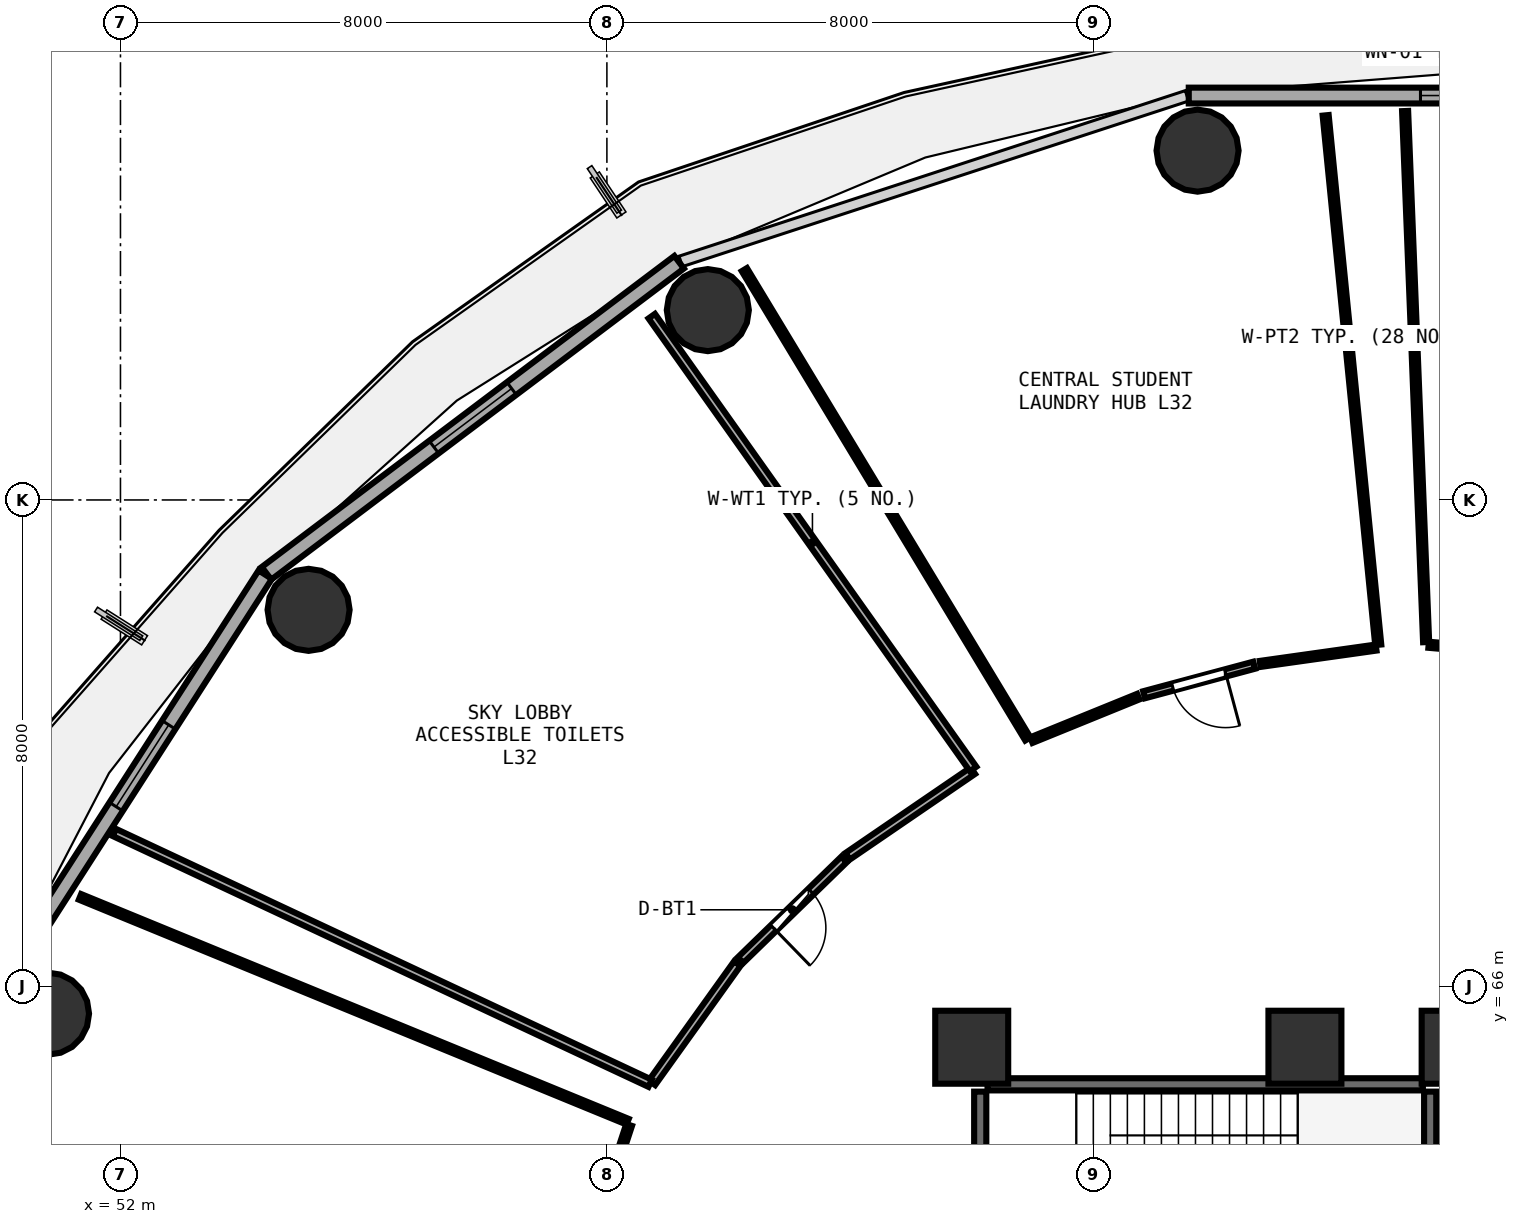
"""IFC4 building model, lengths in metres.
Left out: names, types, materials, properties, quantities, classifications, styles, units other than length and angle.
Written with IfcOpenShell. Run it as: python <this file> out.ifc"""

import sys

from ifc_helpers import new_model, si_unit, direction, frame, frame_2d, origin, origin_2d, place, context, subcontext, project, spatial, rectangle, circle, extrude, element, fill, save


model = new_model("IFC4")
c1 = context("Model", 3, precision=1e-05, world=origin(), true_north=direction((0.0, 1.0)))
c2 = subcontext(c1, "Body", "Model", "MODEL_VIEW")
j1 = project(units=[si_unit("LENGTHUNIT", "METRE"), si_unit("PLANEANGLEUNIT", "RADIAN")], contexts=[c1])
p1 = place(None, origin())
s1 = spatial("IfcSite", under=j1, at=p1, CompositionType="ELEMENT")
p2 = place(p1, origin())
s2 = spatial("IfcBuilding", under=s1, at=p2, CompositionType="ELEMENT")
p3 = place(p2, frame((0.0, 0.0, 125.1)))
s3 = spatial("IfcBuildingStorey", under=s2, at=p3, CompositionType="ELEMENT", Elevation=125.1)
for number, where, z_axis, x_axis in (
    (1, (74.0, 65.0, 0.0), (0.0, 0.0, 1.0), (1.0, 0.0, 0.0)),
    (2, (71.48, 65.0, 0.0), (0.0, 0.0, 1.0), (1.0, 0.0, 0.0)),
    (3, (66.0, 65.0, 0.0), (0.0, 0.0, 1.0), (1.0, 0.0, 0.0)),
):
    element("IfcColumn", number, at=place(p3, frame(where, z_axis=z_axis, x_axis=x_axis)), inside=s3, PredefinedType="PILASTER", context=c2, shape_type="SweptSolid", body=[
        extrude(rectangle(XDim=1.2, YDim=1.2, at=origin_2d()), origin(), (0.0, 0.0, 1.0), 4.76),
    ])
for number, where, z_axis, x_axis in (
    (4, (69.714, 79.745, 0.0), (0.0, 0.0, 1.0), (1.0, 0.0, 0.0)),
    (5, (61.66, 77.122, 0.0), (0.0, 0.0, 1.0), (1.0, 0.0, 0.0)),
    (6, (55.094, 72.193, 0.0), (0.0, 0.0, 1.0), (1.0, 0.0, 0.0)),
    (7, (50.808, 65.552, 0.0), (0.0, 0.0, 1.0), (1.0, 0.0, 0.0)),
):
    element("IfcColumn", number, at=place(p3, frame(where, z_axis=z_axis, x_axis=x_axis)), inside=s3, PredefinedType="COLUMN", context=c2, shape_type="SweptSolid", body=[
        extrude(circle(Radius=0.675, at=origin_2d()), origin(), (0.0, 0.0, 1.0), 4.76),
    ])
p4 = place(p3, frame((78.43, 80.651, 0.0), z_axis=(0.0, 0.0, 1.0), x_axis=(-1.0, 0.0, 0.0)))
e8 = element("IfcWall", 8, at=p4, inside=s3, PredefinedType="SOLIDWALL", context=c2, shape_type="SweptSolid", body=[
    extrude(rectangle(XDim=8.861, YDim=0.26, at=frame_2d((4.43, 0.0))), origin(), (0.0, 0.0, 1.0), 4.345),
])
p5 = place(p4, frame((3.45, 0.0, 0.85)))
e9 = element("IfcOpeningElement", 9, at=p5, cuts=e8, PredefinedType="OPENING", context=c2, shape_type="SweptSolid", body=[
    extrude(rectangle(XDim=1.6, YDim=1.45, at=frame_2d((0.8, 0.725))), frame((0.0, 0.14, 0.0), z_axis=(0.0, -1.0, 0.0), x_axis=(1.0, 0.0, 0.0)), (0.0, 0.0, 1.0), 0.28),
])
p6 = place(p3, frame((61.188, 77.91, 0.0), z_axis=(0.0, 0.0, 1.0), x_axis=(-0.798501507879, -0.601992808857, 0.0)))
e10 = element("IfcWall", 10, at=p6, inside=s3, PredefinedType="SOLIDWALL", context=c2, shape_type="SweptSolid", body=[
    extrude(rectangle(XDim=8.499, YDim=0.26, at=frame_2d((4.25, 0.0))), origin(), (0.0, 0.0, 1.0), 4.345),
])
p7 = place(p6, frame((3.45, 0.0, 0.85)))
e11 = element("IfcOpeningElement", 11, at=p7, cuts=e10, PredefinedType="OPENING", context=c2, shape_type="SweptSolid", body=[
    extrude(rectangle(XDim=1.6, YDim=1.45, at=frame_2d((0.8, 0.725))), frame((0.0, 0.14, 0.0), z_axis=(0.0, -1.0, 0.0), x_axis=(1.0, 0.0, 0.0)), (0.0, 0.0, 1.0), 0.28),
])
p8 = place(p3, frame((54.381, 72.771, 0.0), z_axis=(0.0, 0.0, 1.0), x_axis=(-0.540620528459, -0.841266571432, 0.0)))
e12 = element("IfcWall", 12, at=p8, inside=s3, PredefinedType="SOLIDWALL", context=c2, shape_type="SweptSolid", body=[
    extrude(rectangle(XDim=8.193, YDim=0.26, at=frame_2d((4.096, 0.0))), origin(), (0.0, 0.0, 1.0), 4.345),
])
p9 = place(p8, frame((2.936, 0.0, 0.85)))
e13 = element("IfcOpeningElement", 13, at=p9, cuts=e12, PredefinedType="OPENING", context=c2, shape_type="SweptSolid", body=[
    extrude(rectangle(XDim=1.6, YDim=1.45, at=frame_2d((0.8, 0.725))), frame((0.0, 0.14, 0.0), z_axis=(0.0, -1.0, 0.0), x_axis=(1.0, 0.0, 0.0)), (0.0, 0.0, 1.0), 0.28),
])
p10 = place(p3, frame((73.54, 61.2, 0.0), z_axis=(0.0, 0.0, 1.0), x_axis=(0.0, 1.0, 0.0)))
e14 = element("IfcWall", 14, at=p10, inside=s3, PredefinedType="SHEAR", context=c2, shape_type="SweptSolid", body=[
    extrude(rectangle(XDim=3.07, YDim=0.2, at=frame_2d((1.535, 0.0))), origin(), (0.0, 0.0, 1.0), 4.36),
])
p11 = place(p3, frame((73.42, 64.39, 0.0), z_axis=(0.0, 0.0, 1.0), x_axis=(-1.0, 0.0, 0.0)))
e15 = element("IfcWall", 15, at=p11, inside=s3, PredefinedType="SHEAR", context=c2, shape_type="SweptSolid", body=[
    extrude(rectangle(XDim=7.16, YDim=0.2, at=frame_2d((3.58, 0.0))), origin(), (0.0, 0.0, 1.0), 4.36),
])
p12 = place(p3, frame((66.14, 64.27, 0.0), z_axis=(0.0, 0.0, 1.0), x_axis=(0.0, -1.0, 0.0)))
e16 = element("IfcWall", 16, at=p12, inside=s3, PredefinedType="SHEAR", context=c2, shape_type="SweptSolid", body=[
    extrude(rectangle(XDim=3.07, YDim=0.2, at=frame_2d((1.535, 0.0))), origin(), (0.0, 0.0, 1.0), 4.36),
])
p13 = place(p12, frame((1.01, 0.0, 0.0)))
e17 = element("IfcOpeningElement", 17, at=p13, cuts=e16, PredefinedType="OPENING", context=c2, shape_type="SweptSolid", body=[
    extrude(rectangle(XDim=1.05, YDim=2.1, at=frame_2d((0.525, 1.05))), frame((0.0, 0.11, 0.0), z_axis=(0.0, -1.0, 0.0), x_axis=(1.0, 0.0, 0.0)), (0.0, 0.0, 1.0), 0.22),
])
p14 = place(p3, frame((70.646, 71.282, 0.0), z_axis=(0.0, 0.0, 1.0), x_axis=(-0.965816604619, -0.259226322432, 0.0)))
e18 = element("IfcWall", 18, at=p14, inside=s3, PredefinedType="PARTITIONING", context=c2, shape_type="SweptSolid", body=[
    extrude(rectangle(XDim=1.875, YDim=0.12, at=frame_2d((0.938, 0.0))), origin(), (0.0, 0.0, 1.0), 2.345),
])
p15 = place(p14, frame((0.488, 0.0, 0.0)))
e19 = element("IfcOpeningElement", 19, at=p15, cuts=e18, PredefinedType="OPENING", context=c2, shape_type="SweptSolid", body=[
    extrude(rectangle(XDim=0.9, YDim=2.08, at=frame_2d((0.45, 1.04))), frame((0.0, 0.07, 0.0), z_axis=(0.0, -1.0, 0.0), x_axis=(1.0, 0.0, 0.0)), (0.0, 0.0, 1.0), 0.14),
])
p16 = place(p3, frame((63.9, 68.087, 0.0), z_axis=(0.0, 0.0, 1.0), x_axis=(-0.716864910911, -0.697212090762, 0.0)))
e20 = element("IfcWall", 20, at=p16, inside=s3, PredefinedType="PLUMBINGWALL", context=c2, shape_type="SweptSolid", body=[
    extrude(rectangle(XDim=2.373, YDim=0.13, at=frame_2d((1.187, 0.0))), origin(), (0.0, 0.0, 1.0), 2.345),
])
p17 = place(p16, frame((0.756, 0.0, 0.0)))
e21 = element("IfcOpeningElement", 21, at=p17, cuts=e20, PredefinedType="OPENING", context=c2, shape_type="SweptSolid", body=[
    extrude(rectangle(XDim=0.86, YDim=2.05, at=frame_2d((0.43, 1.025))), frame((0.0, 0.075, 0.0), z_axis=(0.0, -1.0, 0.0), x_axis=(1.0, 0.0, 0.0)), (0.0, 0.0, 1.0), 0.15),
])
p18 = place(p3, frame((60.365, 63.722, 0.0), z_axis=(0.0, 0.0, 1.0), x_axis=(-0.313357160862, -0.949635345665, 0.0)))
e22 = element("IfcWall", 22, at=p18, inside=s3, PredefinedType="PARTITIONING", context=c2, shape_type="SweptSolid", body=[
    extrude(rectangle(XDim=3.906, YDim=0.1, at=frame_2d((1.953, 0.0))), origin(), (0.0, 0.0, 1.0), 4.35),
])
p19 = place(p3, frame((51.334, 67.473, 0.0), z_axis=(0.0, 0.0, 1.0), x_axis=(0.925076928734, -0.379779772927, 0.0)))
e23 = element("IfcWall", 23, at=p19, inside=s3, PredefinedType="PARTITIONING", context=c2, shape_type="SweptSolid", body=[
    extrude(rectangle(XDim=9.737, YDim=0.1, at=frame_2d((4.868, 0.0))), origin(), (0.0, 0.0, 1.0), 2.345),
])
p20 = place(p3, frame((77.341, 71.284, 0.0), z_axis=(0.0, 0.0, 1.0), x_axis=(-0.996212391701, 0.086953266882, 0.0)))
e24 = element("IfcWall", 24, at=p20, inside=s3, PredefinedType="PARTITIONING", context=c2, shape_type="SweptSolid", body=[
    extrude(rectangle(XDim=3.841, YDim=0.1, at=frame_2d((1.92, 0.0))), origin(), (0.0, 0.0, 1.0), 4.35),
])
p21 = place(p3, frame((73.473, 71.662, 0.0), z_axis=(0.0, 0.0, 1.0), x_axis=(-0.039550848763, 0.999217559074, 0.0)))
e25 = element("IfcWall", 25, at=p21, inside=s3, PredefinedType="PARTITIONING", context=c2, shape_type="SweptSolid", body=[
    extrude(rectangle(XDim=8.741, YDim=0.1, at=frame_2d((4.37, 0.0))), origin(), (0.0, 0.0, 1.0), 2.345),
])
p22 = place(p3, frame((72.65, 71.573, 0.0), z_axis=(0.0, 0.0, 1.0), x_axis=(-0.990208987284, -0.139592841869, 0.0)))
e26 = element("IfcWall", 26, at=p22, inside=s3, PredefinedType="PARTITIONING", context=c2, shape_type="SweptSolid", body=[
    extrude(rectangle(XDim=1.926, YDim=0.1, at=frame_2d((0.963, 0.0))), origin(), (0.0, 0.0, 1.0), 2.345),
])
p23 = place(p3, frame((68.74, 70.766, 0.0), z_axis=(0.0, 0.0, 1.0), x_axis=(-0.926243678435, -0.376925255402, 0.0)))
e27 = element("IfcWall", 27, at=p23, inside=s3, PredefinedType="PARTITIONING", context=c2, shape_type="SweptSolid", body=[
    extrude(rectangle(XDim=1.899, YDim=0.1, at=frame_2d((0.95, 0.0))), origin(), (0.0, 0.0, 1.0), 4.35),
])
p24 = place(p3, frame((66.923, 70.069, 0.0), z_axis=(0.0, 0.0, 1.0), x_axis=(-0.517049525693, 0.855955482476, 0.0)))
e28 = element("IfcWall", 28, at=p24, inside=s3, PredefinedType="PARTITIONING", context=c2, shape_type="SweptSolid", body=[
    extrude(rectangle(XDim=9.018, YDim=0.1, at=frame_2d((4.509, 0.0))), origin(), (0.0, 0.0, 1.0), 2.345),
])
p25 = place(p3, frame((71.821, 80.325, 0.0), z_axis=(0.0, 0.0, 1.0), x_axis=(0.098854507854, -0.995101897434, 0.0)))
e29 = element("IfcWall", 29, at=p25, inside=s3, PredefinedType="PARTITIONING", context=c2, shape_type="SweptSolid", body=[
    extrude(rectangle(XDim=8.75, YDim=0.1, at=frame_2d((4.375, 0.0))), origin(), (0.0, 0.0, 1.0), 2.345),
])
p26 = place(p3, frame((66.019, 69.548, 0.0), z_axis=(0.0, 0.0, 1.0), x_axis=(-0.825609680296, -0.564241664362, 0.0)))
e30 = element("IfcWall", 30, at=p26, inside=s3, PredefinedType="PLUMBINGWALL", context=c2, shape_type="SweptSolid", body=[
    extrude(rectangle(XDim=2.494, YDim=0.13, at=frame_2d((1.247, 0.0))), origin(), (0.0, 0.0, 1.0), 2.345),
])
p27 = place(p3, frame((62.144, 66.375, 0.0), z_axis=(0.0, 0.0, 1.0), x_axis=(-0.582387332388, -0.81291143126, 0.0)))
e31 = element("IfcWall", 31, at=p27, inside=s3, PredefinedType="PLUMBINGWALL", context=c2, shape_type="SweptSolid", body=[
    extrude(rectangle(XDim=2.41, YDim=0.13, at=frame_2d((1.205, 0.0))), origin(), (0.0, 0.0, 1.0), 2.345),
])
p28 = place(p3, frame((60.711, 64.407, 0.0), z_axis=(0.0, 0.0, 1.0), x_axis=(-0.905697197088, 0.423925214143, 0.0)))
e32 = element("IfcWall", 32, at=p28, inside=s3, PredefinedType="PLUMBINGWALL", context=c2, shape_type="SweptSolid", body=[
    extrude(rectangle(XDim=9.728, YDim=0.13, at=frame_2d((4.864, 0.0))), origin(), (0.0, 0.0, 1.0), 2.345),
])
p29 = place(p3, frame((60.738, 77.023, 0.0), z_axis=(0.0, 0.0, 1.0), x_axis=(0.578787723886, -0.815478246601, 0.0)))
e33 = element("IfcWall", 33, at=p29, inside=s3, PredefinedType="PLUMBINGWALL", context=c2, shape_type="SweptSolid", body=[
    extrude(rectangle(XDim=9.133, YDim=0.13, at=frame_2d((4.566, 0.0))), origin(), (0.0, 0.0, 1.0), 2.345),
])
p30 = place(p5, origin())
e34 = element("IfcWindow", 34, at=p30, inside=s3, PartitioningType="SINGLE_PANEL", PredefinedType="WINDOW", context=c2, shape_type="SweptSolid", body=[
    extrude(rectangle(XDim=1.6, YDim=1.45, at=frame_2d((0.8, 0.725))), frame((0.0, 0.03, 0.0), z_axis=(0.0, -1.0, 0.0), x_axis=(1.0, 0.0, 0.0)), (0.0, 0.0, 1.0), 0.06),
])
fill(e9, e34)
p31 = place(p7, origin())
e35 = element("IfcWindow", 35, at=p31, inside=s3, PartitioningType="SINGLE_PANEL", PredefinedType="WINDOW", context=c2, shape_type="SweptSolid", body=[
    extrude(rectangle(XDim=1.6, YDim=1.45, at=frame_2d((0.8, 0.725))), frame((0.0, 0.03, 0.0), z_axis=(0.0, -1.0, 0.0), x_axis=(1.0, 0.0, 0.0)), (0.0, 0.0, 1.0), 0.06),
])
fill(e11, e35)
p32 = place(p9, origin())
e36 = element("IfcWindow", 36, at=p32, inside=s3, PartitioningType="SINGLE_PANEL", PredefinedType="WINDOW", context=c2, shape_type="SweptSolid", body=[
    extrude(rectangle(XDim=1.6, YDim=1.45, at=frame_2d((0.8, 0.725))), frame((0.0, 0.03, 0.0), z_axis=(0.0, -1.0, 0.0), x_axis=(1.0, 0.0, 0.0)), (0.0, 0.0, 1.0), 0.06),
])
fill(e13, e36)
p33 = place(p15, origin())
e37 = element("IfcDoor", 37, at=p33, inside=s3, OperationType="SINGLE_SWING_LEFT", PredefinedType="DOOR", context=c2, shape_type="SweptSolid", body=[
    extrude(rectangle(XDim=0.9, YDim=2.08, at=frame_2d((0.45, 1.04))), frame((0.0, 0.025, 0.0), z_axis=(0.0, -1.0, 0.0), x_axis=(1.0, 0.0, 0.0)), (0.0, 0.0, 1.0), 0.05),
])
fill(e19, e37)
p34 = place(p17, origin())
e38 = element("IfcDoor", 38, at=p34, inside=s3, OperationType="SINGLE_SWING_RIGHT", PredefinedType="DOOR", context=c2, shape_type="SweptSolid", body=[
    extrude(rectangle(XDim=0.86, YDim=2.05, at=frame_2d((0.43, 1.025))), frame((0.0, 0.025, 0.0), z_axis=(0.0, -1.0, 0.0), x_axis=(1.0, 0.0, 0.0)), (0.0, 0.0, 1.0), 0.05),
])
fill(e21, e38)
save(model, sys.argv[1])
